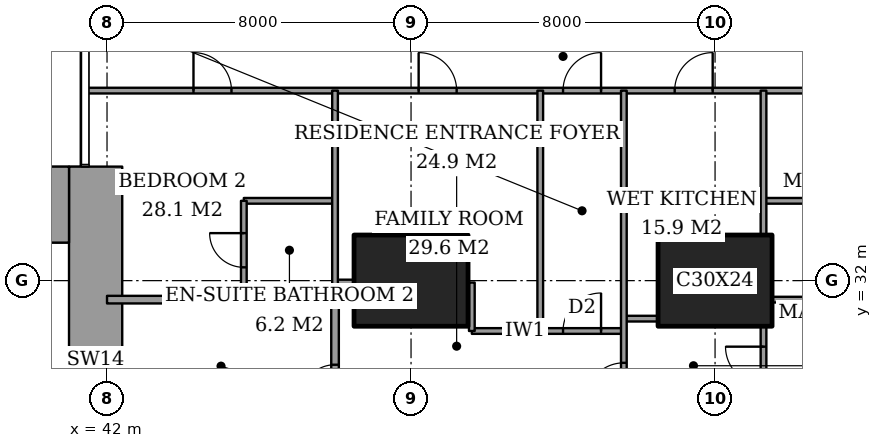
"""IFC4 building model, lengths in metres.
Left out: names, types, materials, properties, quantities, classifications, styles, units other than length and angle.
Written with IfcOpenShell. Run it as: python <this file> out.ifc"""

import sys

from ifc_helpers import new_model, si_unit, direction, frame, frame_2d, origin, origin_2d, place, context, subcontext, project, spatial, rectangle, extrude, element, fill, save


model = new_model("IFC4")
c1 = context("Model", 3, precision=1e-05, world=origin(), true_north=direction((0.0, 1.0)))
c2 = subcontext(c1, "Body", "Model", "MODEL_VIEW")
j1 = project(units=[si_unit("LENGTHUNIT", "METRE"), si_unit("PLANEANGLEUNIT", "RADIAN")], contexts=[c1])
p1 = place(None, origin())
s1 = spatial("IfcSite", under=j1, at=p1, CompositionType="ELEMENT")
p2 = place(p1, origin())
s2 = spatial("IfcBuilding", under=s1, at=p2, CompositionType="ELEMENT")
p3 = place(p2, frame((0.0, 0.0, 47.6)))
s3 = spatial("IfcBuildingStorey", under=s2, at=p3, CompositionType="ELEMENT", Elevation=47.6)
for number, where, z_axis, x_axis in (
    (1, (50.0, 32.0, 0.0), (0.0, 0.0, 1.0), (1.0, 0.0, 0.0)),
    (2, (58.0, 32.0, 0.0), (0.0, 0.0, 1.0), (1.0, 0.0, 0.0)),
):
    element("IfcColumn", number, at=place(p3, frame(where, z_axis=z_axis, x_axis=x_axis)), inside=s3, PredefinedType="COLUMN", context=c2, shape_type="SweptSolid", body=[
        extrude(rectangle(XDim=3.0, YDim=2.4, at=origin_2d()), origin(), (0.0, 0.0, 1.0), 3.6),
    ])
p4 = place(p3, frame((37.85, 34.0, 0.0), z_axis=(0.0, 0.0, 1.0), x_axis=(1.0, 0.0, 0.0)))
e3 = element("IfcWall", 3, at=p4, inside=s3, PredefinedType="SHEAR", context=c2, shape_type="SweptSolid", body=[
    extrude(rectangle(XDim=3.15, YDim=2.0, at=frame_2d((1.575, 0.0))), origin(), (0.0, 0.0, 1.0), 3.6),
])
p5 = place(p3, frame((41.7, 24.85, 0.0), z_axis=(0.0, 0.0, 1.0), x_axis=(0.0, 1.0, 0.0)))
e4 = element("IfcWall", 4, at=p5, inside=s3, PredefinedType="SHEAR", context=c2, shape_type="SweptSolid", body=[
    extrude(rectangle(XDim=10.15, YDim=1.4, at=frame_2d((5.075, 0.0))), origin(), (0.0, 0.0, 1.0), 3.6),
])
p6 = place(p3, frame((51.6, 30.675, 0.0), z_axis=(0.0, 0.0, 1.0), x_axis=(1.0, 0.0, 0.0)))
e5 = element("IfcWall", 5, at=p6, inside=s3, PredefinedType="PARTITIONING", context=c2, shape_type="SweptSolid", body=[
    extrude(rectangle(XDim=4.0, YDim=0.15, at=frame_2d((2.0, 0.0))), origin(), (0.0, 0.0, 1.0), 3.35),
])
p7 = place(p6, frame((2.4, 0.0, 0.0)))
e6 = element("IfcOpeningElement", 6, at=p7, cuts=e5, PredefinedType="OPENING", context=c2, shape_type="SweptSolid", body=[
    extrude(rectangle(XDim=1.0, YDim=2.1, at=frame_2d((0.5, 1.05))), frame((0.0, 0.085, 0.0), z_axis=(0.0, -1.0, 0.0), x_axis=(1.0, 0.0, 0.0)), (0.0, 0.0, 1.0), 0.17),
])
p8 = place(p3, frame((55.6, 31.0, 0.0), z_axis=(0.0, 0.0, 1.0), x_axis=(1.0, 0.0, 0.0)))
e7 = element("IfcWall", 7, at=p8, inside=s3, PredefinedType="PARTITIONING", context=c2, shape_type="SweptSolid", body=[
    extrude(rectangle(XDim=0.9, YDim=0.15, at=frame_2d((0.45, 0.0))), origin(), (0.0, 0.0, 1.0), 3.35),
])
p9 = place(p3, frame((42.0, 31.5, 0.0), z_axis=(0.0, 0.0, 1.0), x_axis=(1.0, 0.0, 0.0)))
e8 = element("IfcWall", 8, at=p9, inside=s3, PredefinedType="PARTITIONING", context=c2, shape_type="SweptSolid", body=[
    extrude(rectangle(XDim=6.0, YDim=0.2, at=frame_2d((3.0, 0.0))), origin(), (0.0, 0.0, 1.0), 3.35),
])
p10 = place(p3, frame((59.5, 31.5, 0.0), z_axis=(0.0, 0.0, 1.0), x_axis=(1.0, 0.0, 0.0)))
e9 = element("IfcWall", 9, at=p10, inside=s3, PredefinedType="PARTITIONING", context=c2, shape_type="SweptSolid", body=[
    extrude(rectangle(XDim=5.15, YDim=0.15, at=frame_2d((2.575, 0.0))), origin(), (0.0, 0.0, 1.0), 3.35),
])
p11 = place(p3, frame((48.0, 31.95, 0.0), z_axis=(0.0, 0.0, 1.0), x_axis=(1.0, 0.0, 0.0)))
e10 = element("IfcWall", 10, at=p11, inside=s3, PredefinedType="PARTITIONING", context=c2, shape_type="SweptSolid", body=[
    extrude(rectangle(XDim=0.5, YDim=0.15, at=frame_2d((0.25, 0.0))), origin(), (0.0, 0.0, 1.0), 2.634),
])
p12 = place(p3, frame((45.6, 34.1, 0.0), z_axis=(0.0, 0.0, 1.0), x_axis=(1.0, 0.0, 0.0)))
e11 = element("IfcWall", 11, at=p12, inside=s3, PredefinedType="PARTITIONING", context=c2, shape_type="SweptSolid", body=[
    extrude(rectangle(XDim=2.4, YDim=0.15, at=frame_2d((1.2, 0.0))), origin(), (0.0, 0.0, 1.0), 3.35),
])
p13 = place(p3, frame((59.275, 34.1, 0.0), z_axis=(0.0, 0.0, 1.0), x_axis=(1.0, 0.0, 0.0)))
e12 = element("IfcWall", 12, at=p13, inside=s3, PredefinedType="PARTITIONING", context=c2, shape_type="SweptSolid", body=[
    extrude(rectangle(XDim=2.4, YDim=0.15, at=frame_2d((1.2, 0.0))), origin(), (0.0, 0.0, 1.0), 3.35),
])
p14 = place(p3, frame((41.439, 37.0, 0.0), z_axis=(0.0, 0.0, 1.0), x_axis=(1.0, 0.0, 0.0)))
e13 = element("IfcWall", 13, at=p14, inside=s3, PredefinedType="PARTITIONING", context=c2, shape_type="SweptSolid", body=[
    extrude(rectangle(XDim=25.011, YDim=0.15, at=frame_2d((12.505, 0.0))), origin(), (0.0, 0.0, 1.0), 3.35),
])
p15 = place(p14, frame((12.561, 0.0, 0.0)))
e14 = element("IfcOpeningElement", 14, at=p15, cuts=e13, PredefinedType="OPENING", context=c2, shape_type="SweptSolid", body=[
    extrude(rectangle(XDim=1.0, YDim=2.1, at=frame_2d((0.5, 1.05))), frame((0.0, 0.085, 0.0), z_axis=(0.0, -1.0, 0.0), x_axis=(1.0, 0.0, 0.0)), (0.0, 0.0, 1.0), 0.17),
])
p16 = place(p14, frame((20.924, 0.0, 0.0)))
e15 = element("IfcOpeningElement", 15, at=p16, cuts=e13, PredefinedType="OPENING", context=c2, shape_type="SweptSolid", body=[
    extrude(rectangle(XDim=1.0, YDim=2.1, at=frame_2d((0.5, 1.05))), frame((0.0, 0.085, 0.0), z_axis=(0.0, -1.0, 0.0), x_axis=(1.0, 0.0, 0.0)), (0.0, 0.0, 1.0), 0.17),
])
p17 = place(p14, frame((15.499, 0.0, 0.0)))
e16 = element("IfcOpeningElement", 16, at=p17, cuts=e13, PredefinedType="OPENING", context=c2, shape_type="SweptSolid", body=[
    extrude(rectangle(XDim=1.0, YDim=2.1, at=frame_2d((0.5, 1.05))), frame((0.0, 0.085, 0.0), z_axis=(0.0, -1.0, 0.0), x_axis=(1.0, 0.0, 0.0)), (0.0, 0.0, 1.0), 0.17),
])
p18 = place(p14, frame((8.761, 0.0, 0.0)))
e17 = element("IfcOpeningElement", 17, at=p18, cuts=e13, PredefinedType="OPENING", context=c2, shape_type="SweptSolid", body=[
    extrude(rectangle(XDim=1.0, YDim=2.1, at=frame_2d((0.5, 1.05))), frame((0.0, 0.085, 0.0), z_axis=(0.0, -1.0, 0.0), x_axis=(1.0, 0.0, 0.0)), (0.0, 0.0, 1.0), 0.17),
])
p19 = place(p14, frame((2.836, 0.0, 0.0)))
e18 = element("IfcOpeningElement", 18, at=p19, cuts=e13, PredefinedType="OPENING", context=c2, shape_type="SweptSolid", body=[
    extrude(rectangle(XDim=1.0, YDim=2.1, at=frame_2d((0.5, 1.05))), frame((0.0, 0.085, 0.0), z_axis=(0.0, -1.0, 0.0), x_axis=(1.0, 0.0, 0.0)), (0.0, 0.0, 1.0), 0.17),
])
p20 = place(p3, frame((45.6, 31.5, 0.0), z_axis=(0.0, 0.0, 1.0), x_axis=(0.0, 1.0, 0.0)))
e19 = element("IfcWall", 19, at=p20, inside=s3, PredefinedType="PARTITIONING", context=c2, shape_type="SweptSolid", body=[
    extrude(rectangle(XDim=2.6, YDim=0.15, at=frame_2d((1.3, 0.0))), origin(), (0.0, 0.0, 1.0), 3.35),
])
p21 = place(p20, frame((0.85, 0.0, 0.0)))
e20 = element("IfcOpeningElement", 20, at=p21, cuts=e19, PredefinedType="OPENING", context=c2, shape_type="SweptSolid", body=[
    extrude(rectangle(XDim=0.9, YDim=2.1, at=frame_2d((0.45, 1.05))), frame((0.0, 0.085, 0.0), z_axis=(0.0, -1.0, 0.0), x_axis=(1.0, 0.0, 0.0)), (0.0, 0.0, 1.0), 0.17),
])
p22 = place(p3, frame((48.0, 28.0, 0.0), z_axis=(0.0, 0.0, 1.0), x_axis=(0.0, 1.0, 0.0)))
e21 = element("IfcWall", 21, at=p22, inside=s3, PredefinedType="PARTITIONING", context=c2, shape_type="SweptSolid", body=[
    extrude(rectangle(XDim=3.5, YDim=0.2, at=frame_2d((1.75, 0.0))), origin(), (0.0, 0.0, 1.0), 3.35),
])
p23 = place(p22, frame((0.887, 0.0, 0.0)))
e22 = element("IfcOpeningElement", 22, at=p23, cuts=e21, PredefinedType="OPENING", context=c2, shape_type="SweptSolid", body=[
    extrude(rectangle(XDim=0.9, YDim=2.1, at=frame_2d((0.45, 1.05))), frame((0.0, 0.11, 0.0), z_axis=(0.0, -1.0, 0.0), x_axis=(1.0, 0.0, 0.0)), (0.0, 0.0, 1.0), 0.22),
])
p24 = place(p3, frame((48.0, 31.5, 0.0), z_axis=(0.0, 0.0, 1.0), x_axis=(0.0, 1.0, 0.0)))
e23 = element("IfcWall", 23, at=p24, inside=s3, PredefinedType="PARTITIONING", context=c2, shape_type="SweptSolid", body=[
    extrude(rectangle(XDim=5.5, YDim=0.15, at=frame_2d((2.75, 0.0))), origin(), (0.0, 0.0, 1.0), 3.35),
])
p25 = place(p3, frame((51.6, 30.675, 0.0), z_axis=(0.0, 0.0, 1.0), x_axis=(0.0, 1.0, 0.0)))
e24 = element("IfcWall", 24, at=p25, inside=s3, PredefinedType="PARTITIONING", context=c2, shape_type="SweptSolid", body=[
    extrude(rectangle(XDim=1.275, YDim=0.15, at=frame_2d((0.637, 0.0))), origin(), (0.0, 0.0, 1.0), 3.35),
])
p26 = place(p3, frame((53.4, 30.675, 0.0), z_axis=(0.0, 0.0, 1.0), x_axis=(0.0, 1.0, 0.0)))
e25 = element("IfcWall", 25, at=p26, inside=s3, PredefinedType="PARTITIONING", context=c2, shape_type="SweptSolid", body=[
    extrude(rectangle(XDim=6.325, YDim=0.15, at=frame_2d((3.163, 0.0))), origin(), (0.0, 0.0, 1.0), 3.35),
])
p27 = place(p3, frame((55.6, 28.0, 0.0), z_axis=(0.0, 0.0, 1.0), x_axis=(0.0, 1.0, 0.0)))
e26 = element("IfcWall", 26, at=p27, inside=s3, PredefinedType="PARTITIONING", context=c2, shape_type="SweptSolid", body=[
    extrude(rectangle(XDim=9.0, YDim=0.15, at=frame_2d((4.5, 0.0))), origin(), (0.0, 0.0, 1.0), 3.35),
])
p28 = place(p27, frame((0.837, 0.0, 0.0)))
e27 = element("IfcOpeningElement", 27, at=p28, cuts=e26, PredefinedType="OPENING", context=c2, shape_type="SweptSolid", body=[
    extrude(rectangle(XDim=1.0, YDim=2.1, at=frame_2d((0.5, 1.05))), frame((0.0, 0.085, 0.0), z_axis=(0.0, -1.0, 0.0), x_axis=(1.0, 0.0, 0.0)), (0.0, 0.0, 1.0), 0.17),
])
p29 = place(p3, frame((59.275, 28.35, 0.0), z_axis=(0.0, 0.0, 1.0), x_axis=(0.0, 1.0, 0.0)))
e28 = element("IfcWall", 28, at=p29, inside=s3, PredefinedType="PARTITIONING", context=c2, shape_type="SweptSolid", body=[
    extrude(rectangle(XDim=2.45, YDim=0.15, at=frame_2d((1.225, 0.0))), origin(), (0.0, 0.0, 1.0), 3.35),
])
p30 = place(p29, frame((0.913, 0.0, 0.0)))
e29 = element("IfcOpeningElement", 29, at=p30, cuts=e28, PredefinedType="OPENING", context=c2, shape_type="SweptSolid", body=[
    extrude(rectangle(XDim=1.0, YDim=2.1, at=frame_2d((0.5, 1.05))), frame((0.0, 0.085, 0.0), z_axis=(0.0, -1.0, 0.0), x_axis=(1.0, 0.0, 0.0)), (0.0, 0.0, 1.0), 0.17),
])
p31 = place(p3, frame((59.275, 33.2, 0.0), z_axis=(0.0, 0.0, 1.0), x_axis=(0.0, 1.0, 0.0)))
e30 = element("IfcWall", 30, at=p31, inside=s3, PredefinedType="PARTITIONING", context=c2, shape_type="SweptSolid", body=[
    extrude(rectangle(XDim=3.8, YDim=0.15, at=frame_2d((1.9, 0.0))), origin(), (0.0, 0.0, 1.0), 3.35),
])
p32 = place(p15, origin())
e31 = element("IfcDoor", 31, at=p32, inside=s3, OperationType="SINGLE_SWING_LEFT", PredefinedType="DOOR", context=c2, shape_type="SweptSolid", body=[
    extrude(rectangle(XDim=1.0, YDim=2.1, at=frame_2d((0.5, 1.05))), frame((0.0, 0.025, 0.0), z_axis=(0.0, -1.0, 0.0), x_axis=(1.0, 0.0, 0.0)), (0.0, 0.0, 1.0), 0.05),
])
fill(e14, e31)
p33 = place(p30, origin())
e32 = element("IfcDoor", 32, at=p33, inside=s3, OperationType="SINGLE_SWING_LEFT", PredefinedType="DOOR", context=c2, shape_type="SweptSolid", body=[
    extrude(rectangle(XDim=1.0, YDim=2.1, at=frame_2d((0.5, 1.05))), frame((0.0, 0.025, 0.0), z_axis=(0.0, -1.0, 0.0), x_axis=(1.0, 0.0, 0.0)), (0.0, 0.0, 1.0), 0.05),
])
fill(e29, e32)
p34 = place(p17, origin())
e33 = element("IfcDoor", 33, at=p34, inside=s3, OperationType="SINGLE_SWING_LEFT", PredefinedType="DOOR", context=c2, shape_type="SweptSolid", body=[
    extrude(rectangle(XDim=1.0, YDim=2.1, at=frame_2d((0.5, 1.05))), frame((0.0, 0.025, 0.0), z_axis=(0.0, -1.0, 0.0), x_axis=(1.0, 0.0, 0.0)), (0.0, 0.0, 1.0), 0.05),
])
fill(e16, e33)
p35 = place(p28, origin())
e34 = element("IfcDoor", 34, at=p35, inside=s3, OperationType="SINGLE_SWING_RIGHT", PredefinedType="DOOR", context=c2, shape_type="SweptSolid", body=[
    extrude(rectangle(XDim=1.0, YDim=2.1, at=frame_2d((0.5, 1.05))), frame((0.0, 0.025, 0.0), z_axis=(0.0, -1.0, 0.0), x_axis=(1.0, 0.0, 0.0)), (0.0, 0.0, 1.0), 0.05),
])
fill(e27, e34)
p36 = place(p7, origin())
e35 = element("IfcDoor", 35, at=p36, inside=s3, OperationType="SINGLE_SWING_LEFT", PredefinedType="DOOR", context=c2, shape_type="SweptSolid", body=[
    extrude(rectangle(XDim=1.0, YDim=2.1, at=frame_2d((0.5, 1.05))), frame((0.0, 0.025, 0.0), z_axis=(0.0, -1.0, 0.0), x_axis=(1.0, 0.0, 0.0)), (0.0, 0.0, 1.0), 0.05),
])
fill(e6, e35)
p37 = place(p18, origin())
e36 = element("IfcDoor", 36, at=p37, inside=s3, OperationType="SINGLE_SWING_RIGHT", PredefinedType="DOOR", context=c2, shape_type="SweptSolid", body=[
    extrude(rectangle(XDim=1.0, YDim=2.1, at=frame_2d((0.5, 1.05))), frame((0.0, 0.025, 0.0), z_axis=(0.0, -1.0, 0.0), x_axis=(1.0, 0.0, 0.0)), (0.0, 0.0, 1.0), 0.05),
])
fill(e17, e36)
p38 = place(p21, origin())
e37 = element("IfcDoor", 37, at=p38, inside=s3, OperationType="SINGLE_SWING_LEFT", PredefinedType="DOOR", context=c2, shape_type="SweptSolid", body=[
    extrude(rectangle(XDim=0.9, YDim=2.1, at=frame_2d((0.45, 1.05))), frame((0.0, 0.025, 0.0), z_axis=(0.0, -1.0, 0.0), x_axis=(1.0, 0.0, 0.0)), (0.0, 0.0, 1.0), 0.05),
])
fill(e20, e37)
p39 = place(p19, origin())
e38 = element("IfcDoor", 38, at=p39, inside=s3, OperationType="SINGLE_SWING_RIGHT", PredefinedType="DOOR", context=c2, shape_type="SweptSolid", body=[
    extrude(rectangle(XDim=1.0, YDim=2.1, at=frame_2d((0.5, 1.05))), frame((0.0, 0.025, 0.0), z_axis=(0.0, -1.0, 0.0), x_axis=(1.0, 0.0, 0.0)), (0.0, 0.0, 1.0), 0.05),
])
fill(e18, e38)
p40 = place(p23, origin())
e39 = element("IfcDoor", 39, at=p40, inside=s3, OperationType="SINGLE_SWING_RIGHT", PredefinedType="DOOR", context=c2, shape_type="SweptSolid", body=[
    extrude(rectangle(XDim=0.9, YDim=2.1, at=frame_2d((0.45, 1.05))), frame((0.0, 0.025, 0.0), z_axis=(0.0, -1.0, 0.0), x_axis=(1.0, 0.0, 0.0)), (0.0, 0.0, 1.0), 0.05),
])
fill(e22, e39)
save(model, sys.argv[1])
